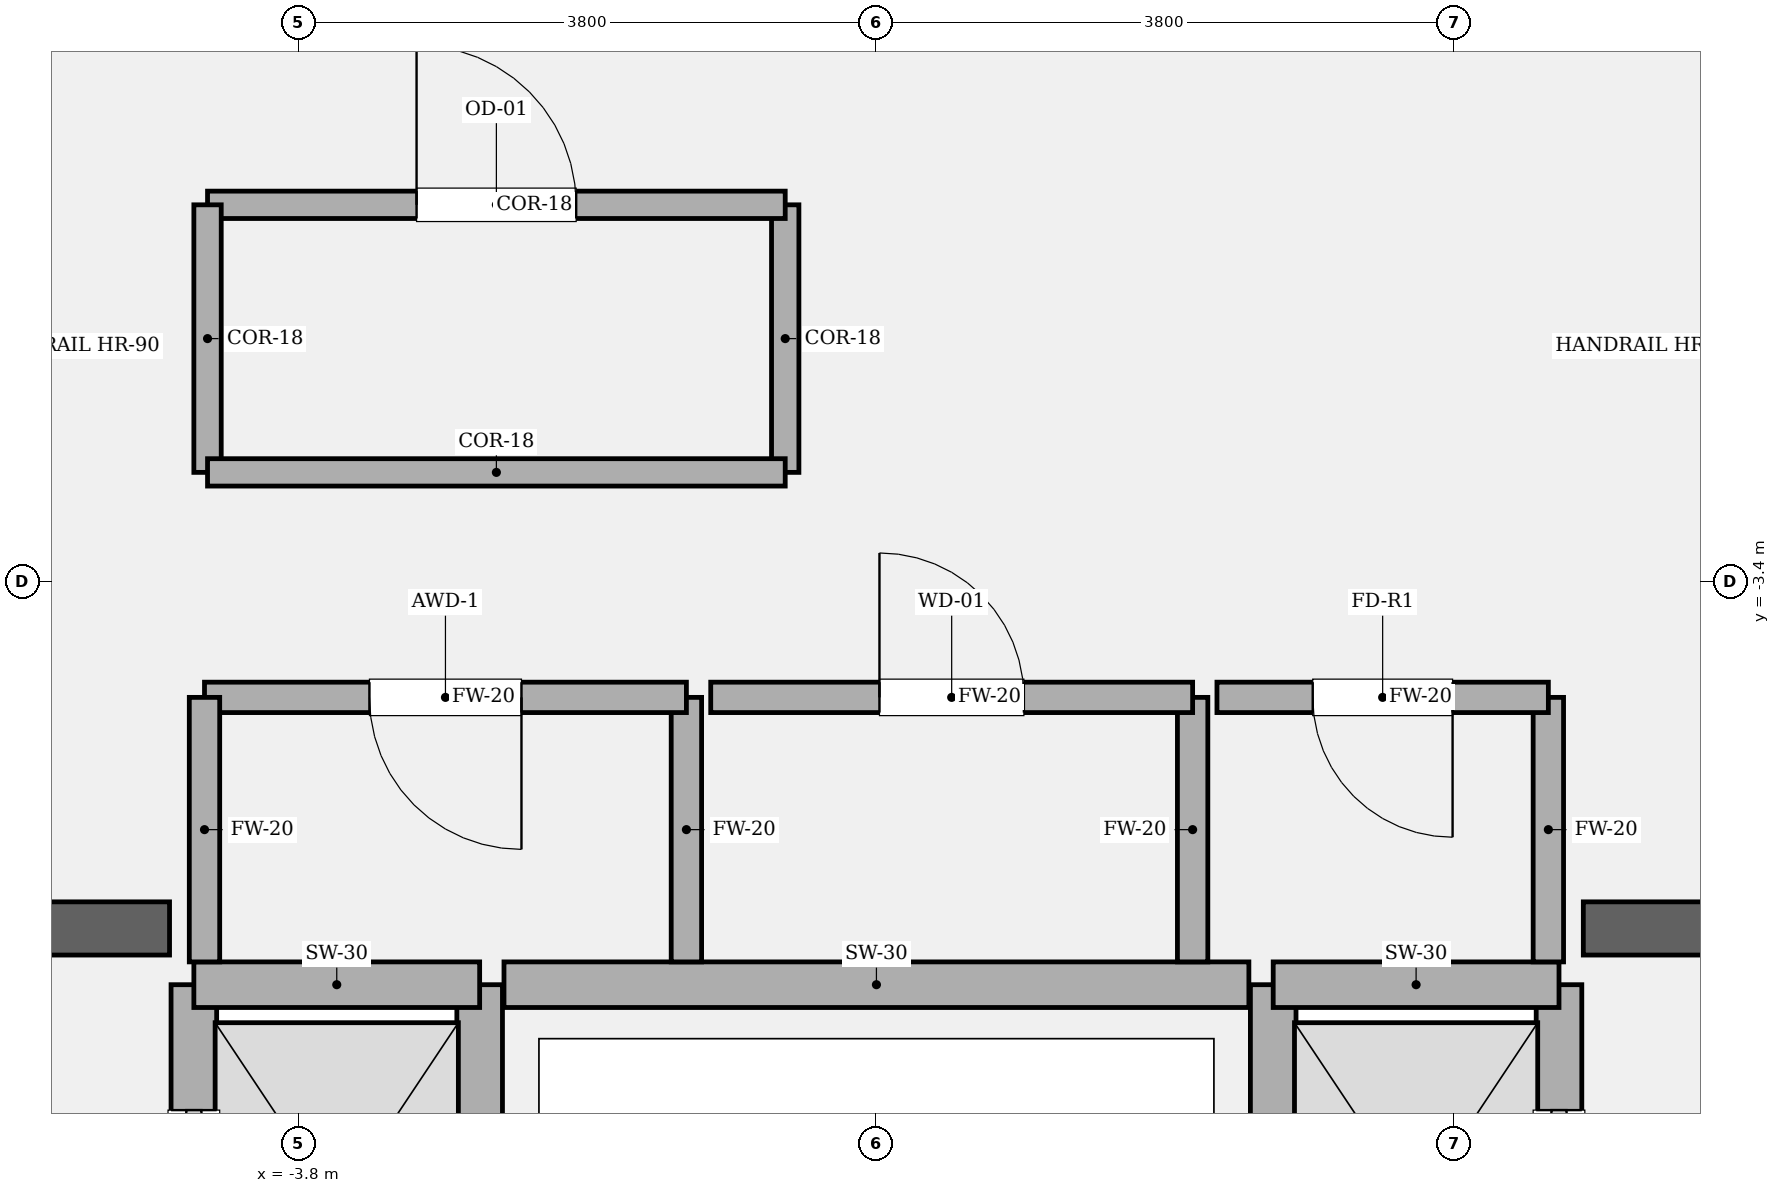
"""IFC4 building model, lengths in metres.
Left out: names, types, materials, properties, quantities, classifications, styles, units other than length and angle.
Written with IfcOpenShell. Run it as: python <this file> out.ifc"""

import sys

from ifc_helpers import new_model, si_unit, direction, frame, frame_2d, origin, place, context, subcontext, project, spatial, rectangle, extrude, element, fill, save


model = new_model("IFC4")
c1 = context("Model", 3, precision=1e-05, world=origin(), true_north=direction((0.0, 1.0)))
c2 = subcontext(c1, "Body", "Model", "MODEL_VIEW")
j1 = project(units=[si_unit("LENGTHUNIT", "METRE"), si_unit("PLANEANGLEUNIT", "RADIAN")], contexts=[c1])
p1 = place(None, origin())
s1 = spatial("IfcSite", under=j1, at=p1, CompositionType="ELEMENT")
p2 = place(p1, origin())
s2 = spatial("IfcBuilding", under=s1, at=p2, CompositionType="ELEMENT")
p3 = place(p2, frame((0.0, 0.0, 156.0)))
s3 = spatial("IfcBuildingStorey", under=s2, at=p3, CompositionType="ELEMENT", Elevation=156.0)
p4 = place(p3, frame((-9.875, -5.68, 0.0), z_axis=(0.0, 0.0, 1.0), x_axis=(1.0, 0.0, 0.0)))
e1 = element("IfcWall", 1, at=p4, inside=s3, PredefinedType="SOLIDWALL", context=c2, shape_type="SweptSolid", body=[
    extrude(rectangle(XDim=5.225, YDim=0.35, at=frame_2d((2.613, 0.0))), origin(), (0.0, 0.0, 1.0), 4.05),
])
p5 = place(p4, frame((1.335, 0.0, 0.0)))
e2 = element("IfcOpeningElement", 2, at=p5, cuts=e1, PredefinedType="OPENING", context=c2, shape_type="SweptSolid", body=[
    extrude(rectangle(XDim=1.18, YDim=2.2, at=frame_2d((0.59, 1.1))), frame((0.0, 0.185, 0.0), z_axis=(0.0, -1.0, 0.0), x_axis=(1.0, 0.0, 0.0)), (0.0, 0.0, 1.0), 0.37),
])
p6 = place(p3, frame((4.65, -5.68, 0.0), z_axis=(0.0, 0.0, 1.0), x_axis=(1.0, 0.0, 0.0)))
e3 = element("IfcWall", 3, at=p6, inside=s3, PredefinedType="SOLIDWALL", context=c2, shape_type="SweptSolid", body=[
    extrude(rectangle(XDim=5.225, YDim=0.35, at=frame_2d((2.613, 0.0))), origin(), (0.0, 0.0, 1.0), 4.05),
])
p7 = place(p6, frame((2.71, 0.0, 0.0)))
e4 = element("IfcOpeningElement", 4, at=p7, cuts=e3, PredefinedType="OPENING", context=c2, shape_type="SweptSolid", body=[
    extrude(rectangle(XDim=1.18, YDim=2.2, at=frame_2d((0.59, 1.1))), frame((0.0, 0.185, 0.0), z_axis=(0.0, -1.0, 0.0), x_axis=(1.0, 0.0, 0.0)), (0.0, 0.0, 1.0), 0.37),
])
p8 = place(p3, frame((-4.49, -8.82, 0.0), z_axis=(0.0, 0.0, 1.0), x_axis=(0.0, 1.0, 0.0)))
e5 = element("IfcWall", 5, at=p8, inside=s3, PredefinedType="SOLIDWALL", context=c2, shape_type="SweptSolid", body=[
    extrude(rectangle(XDim=2.77, YDim=0.3, at=frame_2d((1.385, 0.0))), origin(), (0.0, 0.0, 1.0), 3.83),
])
p9 = place(p8, frame((0.825, 0.0, 0.0)))
e6 = element("IfcOpeningElement", 6, at=p9, cuts=e5, PredefinedType="OPENING", context=c2, shape_type="SweptSolid", body=[
    extrude(rectangle(XDim=1.12, YDim=2.25, at=frame_2d((0.56, 1.125))), frame((0.0, 0.16, 0.0), z_axis=(0.0, -1.0, 0.0), x_axis=(1.0, 0.0, 0.0)), (0.0, 0.0, 1.0), 0.32),
])
p10 = place(p3, frame((-2.61, -8.82, 0.0), z_axis=(0.0, 0.0, 1.0), x_axis=(0.0, 1.0, 0.0)))
e7 = element("IfcWall", 7, at=p10, inside=s3, PredefinedType="SOLIDWALL", context=c2, shape_type="SweptSolid", body=[
    extrude(rectangle(XDim=2.77, YDim=0.3, at=frame_2d((1.385, 0.0))), origin(), (0.0, 0.0, 1.0), 3.83),
])
p11 = place(p3, frame((-4.49, -6.05, 0.0), z_axis=(0.0, 0.0, 1.0), x_axis=(1.0, 0.0, 0.0)))
e8 = element("IfcWall", 8, at=p11, inside=s3, PredefinedType="SOLIDWALL", context=c2, shape_type="SweptSolid", body=[
    extrude(rectangle(XDim=1.88, YDim=0.3, at=frame_2d((0.94, 0.0))), origin(), (0.0, 0.0, 1.0), 3.83),
])
p12 = place(p3, frame((4.49, -8.82, 0.0), z_axis=(0.0, 0.0, 1.0), x_axis=(0.0, 1.0, 0.0)))
e9 = element("IfcWall", 9, at=p12, inside=s3, PredefinedType="SOLIDWALL", context=c2, shape_type="SweptSolid", body=[
    extrude(rectangle(XDim=2.77, YDim=0.3, at=frame_2d((1.385, 0.0))), origin(), (0.0, 0.0, 1.0), 3.83),
])
p13 = place(p12, frame((0.825, 0.0, 0.0)))
e10 = element("IfcOpeningElement", 10, at=p13, cuts=e9, PredefinedType="OPENING", context=c2, shape_type="SweptSolid", body=[
    extrude(rectangle(XDim=1.12, YDim=2.25, at=frame_2d((0.56, 1.125))), frame((0.0, 0.16, 0.0), z_axis=(0.0, -1.0, 0.0), x_axis=(1.0, 0.0, 0.0)), (0.0, 0.0, 1.0), 0.32),
])
p14 = place(p3, frame((2.61, -8.82, 0.0), z_axis=(0.0, 0.0, 1.0), x_axis=(0.0, 1.0, 0.0)))
e11 = element("IfcWall", 11, at=p14, inside=s3, PredefinedType="SOLIDWALL", context=c2, shape_type="SweptSolid", body=[
    extrude(rectangle(XDim=2.77, YDim=0.3, at=frame_2d((1.385, 0.0))), origin(), (0.0, 0.0, 1.0), 3.83),
])
p15 = place(p3, frame((2.61, -6.05, 0.0), z_axis=(0.0, 0.0, 1.0), x_axis=(1.0, 0.0, 0.0)))
e12 = element("IfcWall", 12, at=p15, inside=s3, PredefinedType="SOLIDWALL", context=c2, shape_type="SweptSolid", body=[
    extrude(rectangle(XDim=1.88, YDim=0.3, at=frame_2d((0.94, 0.0))), origin(), (0.0, 0.0, 1.0), 3.83),
])
p16 = place(p3, frame((-2.45, -6.05, 0.0), z_axis=(0.0, 0.0, 1.0), x_axis=(1.0, 0.0, 0.0)))
e13 = element("IfcWall", 13, at=p16, inside=s3, PredefinedType="SOLIDWALL", context=c2, shape_type="SweptSolid", body=[
    extrude(rectangle(XDim=4.9, YDim=0.3, at=frame_2d((2.45, 0.0))), origin(), (0.0, 0.0, 1.0), 3.83),
])
p17 = place(p3, frame((-1.25, -5.9, 0.0), z_axis=(0.0, 0.0, 1.0), x_axis=(0.0, 1.0, 0.0)))
e14 = element("IfcWall", 14, at=p17, inside=s3, PredefinedType="SOLIDWALL", context=c2, shape_type="SweptSolid", body=[
    extrude(rectangle(XDim=1.74, YDim=0.2, at=frame_2d((0.87, 0.0))), origin(), (0.0, 0.0, 1.0), 3.83),
])
p18 = place(p3, frame((-1.25, -4.16, 0.0), z_axis=(0.0, 0.0, 1.0), x_axis=(-1.0, 0.0, 0.0)))
e15 = element("IfcWall", 15, at=p18, inside=s3, PredefinedType="SOLIDWALL", context=c2, shape_type="SweptSolid", body=[
    extrude(rectangle(XDim=3.17, YDim=0.2, at=frame_2d((1.585, 0.0))), origin(), (0.0, 0.0, 1.0), 3.83),
])
p19 = place(p18, frame((1.085, 0.0, 0.0)))
e16 = element("IfcOpeningElement", 16, at=p19, cuts=e15, PredefinedType="OPENING", context=c2, shape_type="SweptSolid", body=[
    extrude(rectangle(XDim=1.0, YDim=2.15, at=frame_2d((0.5, 1.075))), frame((0.0, 0.11, 0.0), z_axis=(0.0, -1.0, 0.0), x_axis=(1.0, 0.0, 0.0)), (0.0, 0.0, 1.0), 0.22),
])
for number, where, z_axis, x_axis in (
    (17, (-4.42, -4.16, 0.0), (0.0, 0.0, 1.0), (0.0, -1.0, 0.0)),
    (18, (2.08, -5.9, 0.0), (0.0, 0.0, 1.0), (0.0, 1.0, 0.0)),
):
    element("IfcWall", number, at=place(p3, frame(where, z_axis=z_axis, x_axis=x_axis)), inside=s3, PredefinedType="SOLIDWALL", context=c2, shape_type="SweptSolid", body=[
        extrude(rectangle(XDim=1.74, YDim=0.2, at=frame_2d((0.87, 0.0))), origin(), (0.0, 0.0, 1.0), 3.83),
    ])
p20 = place(p3, frame((2.08, -4.16, 0.0), z_axis=(0.0, 0.0, 1.0), x_axis=(-1.0, 0.0, 0.0)))
e19 = element("IfcWall", 19, at=p20, inside=s3, PredefinedType="SOLIDWALL", context=c2, shape_type="SweptSolid", body=[
    extrude(rectangle(XDim=3.17, YDim=0.2, at=frame_2d((1.585, 0.0))), origin(), (0.0, 0.0, 1.0), 3.83),
])
p21 = place(p20, frame((1.11, 0.0, 0.0)))
e20 = element("IfcOpeningElement", 20, at=p21, cuts=e19, PredefinedType="OPENING", context=c2, shape_type="SweptSolid", body=[
    extrude(rectangle(XDim=0.95, YDim=2.15, at=frame_2d((0.475, 1.075))), frame((0.0, 0.11, 0.0), z_axis=(0.0, -1.0, 0.0), x_axis=(1.0, 0.0, 0.0)), (0.0, 0.0, 1.0), 0.22),
])
p22 = place(p3, frame((4.42, -5.9, 0.0), z_axis=(0.0, 0.0, 1.0), x_axis=(0.0, 1.0, 0.0)))
e21 = element("IfcWall", 21, at=p22, inside=s3, PredefinedType="SOLIDWALL", context=c2, shape_type="SweptSolid", body=[
    extrude(rectangle(XDim=1.74, YDim=0.2, at=frame_2d((0.87, 0.0))), origin(), (0.0, 0.0, 1.0), 3.83),
])
p23 = place(p3, frame((4.42, -4.16, 0.0), z_axis=(0.0, 0.0, 1.0), x_axis=(-1.0, 0.0, 0.0)))
e22 = element("IfcWall", 22, at=p23, inside=s3, PredefinedType="SOLIDWALL", context=c2, shape_type="SweptSolid", body=[
    extrude(rectangle(XDim=2.18, YDim=0.2, at=frame_2d((1.09, 0.0))), origin(), (0.0, 0.0, 1.0), 3.83),
])
p24 = place(p23, frame((0.63, 0.0, 0.0)))
e23 = element("IfcOpeningElement", 23, at=p24, cuts=e22, PredefinedType="OPENING", context=c2, shape_type="SweptSolid", body=[
    extrude(rectangle(XDim=0.92, YDim=2.1, at=frame_2d((0.46, 1.05))), frame((0.0, 0.11, 0.0), z_axis=(0.0, -1.0, 0.0), x_axis=(1.0, 0.0, 0.0)), (0.0, 0.0, 1.0), 0.22),
])
p25 = place(p3, frame((-0.6, -2.68, 0.0), z_axis=(0.0, 0.0, 1.0), x_axis=(0.0, 1.0, 0.0)))
e24 = element("IfcWall", 24, at=p25, inside=s3, PredefinedType="PARTITIONING", context=c2, shape_type="SweptSolid", body=[
    extrude(rectangle(XDim=1.76, YDim=0.18, at=frame_2d((0.88, 0.0))), origin(), (0.0, 0.0, 1.0), 3.83),
])
p26 = place(p3, frame((-0.6, -0.92, 0.0), z_axis=(0.0, 0.0, 1.0), x_axis=(-1.0, 0.0, 0.0)))
e25 = element("IfcWall", 25, at=p26, inside=s3, PredefinedType="PARTITIONING", context=c2, shape_type="SweptSolid", body=[
    extrude(rectangle(XDim=3.8, YDim=0.18, at=frame_2d((1.9, 0.0))), origin(), (0.0, 0.0, 1.0), 3.83),
])
p27 = place(p26, frame((1.375, 0.0, 0.0)))
e26 = element("IfcOpeningElement", 26, at=p27, cuts=e25, PredefinedType="OPENING", context=c2, shape_type="SweptSolid", body=[
    extrude(rectangle(XDim=1.05, YDim=2.2, at=frame_2d((0.525, 1.1))), frame((0.0, 0.1, 0.0), z_axis=(0.0, -1.0, 0.0), x_axis=(1.0, 0.0, 0.0)), (0.0, 0.0, 1.0), 0.2),
])
p28 = place(p3, frame((-4.4, -0.92, 0.0), z_axis=(0.0, 0.0, 1.0), x_axis=(0.0, -1.0, 0.0)))
e27 = element("IfcWall", 27, at=p28, inside=s3, PredefinedType="PARTITIONING", context=c2, shape_type="SweptSolid", body=[
    extrude(rectangle(XDim=1.76, YDim=0.18, at=frame_2d((0.88, 0.0))), origin(), (0.0, 0.0, 1.0), 3.83),
])
p29 = place(p3, frame((-4.4, -2.68, 0.0), z_axis=(0.0, 0.0, 1.0), x_axis=(1.0, 0.0, 0.0)))
e28 = element("IfcWall", 28, at=p29, inside=s3, PredefinedType="PARTITIONING", context=c2, shape_type="SweptSolid", body=[
    extrude(rectangle(XDim=3.8, YDim=0.18, at=frame_2d((1.9, 0.0))), origin(), (0.0, 0.0, 1.0), 3.83),
])
p30 = place(p9, origin())
e29 = element("IfcDoor", 29, at=p30, inside=s3, OperationType="SLIDING_TO_LEFT", PredefinedType="DOOR", context=c2, shape_type="SweptSolid", body=[
    extrude(rectangle(XDim=1.12, YDim=2.25, at=frame_2d((0.56, 1.125))), frame((0.0, 0.025, 0.0), z_axis=(0.0, -1.0, 0.0), x_axis=(1.0, 0.0, 0.0)), (0.0, 0.0, 1.0), 0.05),
])
fill(e6, e29)
p31 = place(p13, origin())
e30 = element("IfcDoor", 30, at=p31, inside=s3, OperationType="SLIDING_TO_RIGHT", PredefinedType="DOOR", context=c2, shape_type="SweptSolid", body=[
    extrude(rectangle(XDim=1.12, YDim=2.25, at=frame_2d((0.56, 1.125))), frame((0.0, 0.025, 0.0), z_axis=(0.0, -1.0, 0.0), x_axis=(1.0, 0.0, 0.0)), (0.0, 0.0, 1.0), 0.05),
])
fill(e10, e30)
p32 = place(p19, origin())
e31 = element("IfcDoor", 31, at=p32, inside=s3, OperationType="SINGLE_SWING_LEFT", PredefinedType="DOOR", context=c2, shape_type="SweptSolid", body=[
    extrude(rectangle(XDim=1.0, YDim=2.15, at=frame_2d((0.5, 1.075))), frame((0.0, 0.025, 0.0), z_axis=(0.0, -1.0, 0.0), x_axis=(1.0, 0.0, 0.0)), (0.0, 0.0, 1.0), 0.05),
])
fill(e16, e31)
p33 = place(p21, origin())
e32 = element("IfcDoor", 32, at=p33, inside=s3, OperationType="SINGLE_SWING_RIGHT", PredefinedType="DOOR", context=c2, shape_type="SweptSolid", body=[
    extrude(rectangle(XDim=0.95, YDim=2.15, at=frame_2d((0.475, 1.075))), frame((0.0, 0.025, 0.0), z_axis=(0.0, -1.0, 0.0), x_axis=(1.0, 0.0, 0.0)), (0.0, 0.0, 1.0), 0.05),
])
fill(e20, e32)
p34 = place(p24, origin())
e33 = element("IfcDoor", 33, at=p34, inside=s3, OperationType="SINGLE_SWING_LEFT", PredefinedType="DOOR", context=c2, shape_type="SweptSolid", body=[
    extrude(rectangle(XDim=0.92, YDim=2.1, at=frame_2d((0.46, 1.05))), frame((0.0, 0.025, 0.0), z_axis=(0.0, -1.0, 0.0), x_axis=(1.0, 0.0, 0.0)), (0.0, 0.0, 1.0), 0.05),
])
fill(e23, e33)
p35 = place(p27, origin())
e34 = element("IfcDoor", 34, at=p35, inside=s3, OperationType="SINGLE_SWING_RIGHT", PredefinedType="DOOR", context=c2, shape_type="SweptSolid", body=[
    extrude(rectangle(XDim=1.05, YDim=2.2, at=frame_2d((0.525, 1.1))), frame((0.0, 0.025, 0.0), z_axis=(0.0, -1.0, 0.0), x_axis=(1.0, 0.0, 0.0)), (0.0, 0.0, 1.0), 0.05),
])
fill(e26, e34)
save(model, sys.argv[1])
